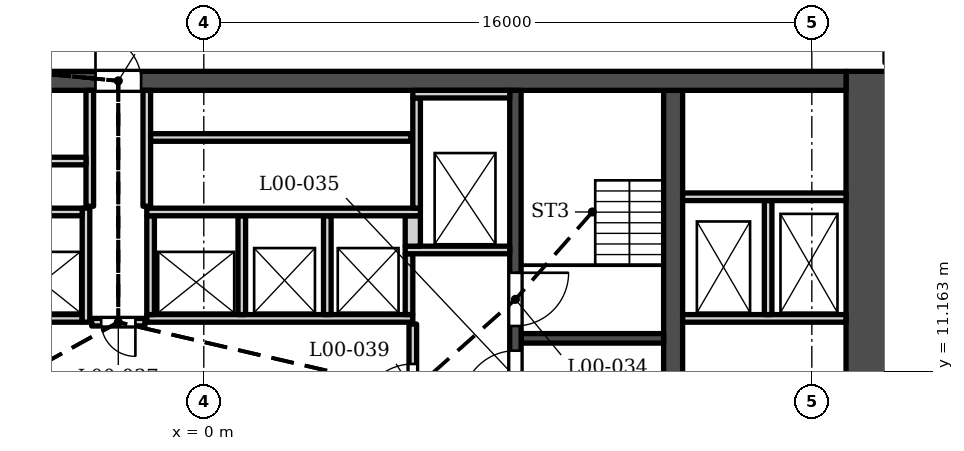
"""IFC4 building model, lengths in metres.
Left out: names, types, materials, properties, quantities, classifications, styles, units other than length and angle.
Written with IfcOpenShell. Run it as: python <this file> out.ifc"""

import sys

from ifc_helpers import new_model, si_unit, direction, frame, frame_2d, origin, place, context, subcontext, project, spatial, rectangle, extrude, element, fill, save


model = new_model("IFC4")
c1 = context("Model", 3, precision=1e-05, world=origin(), true_north=direction((0.0, 1.0)))
c2 = subcontext(c1, "Body", "Model", "MODEL_VIEW")
j1 = project(units=[si_unit("LENGTHUNIT", "METRE"), si_unit("PLANEANGLEUNIT", "RADIAN")], contexts=[c1])
p1 = place(None, origin())
s1 = spatial("IfcSite", under=j1, at=p1, CompositionType="ELEMENT")
p2 = place(p1, origin())
s2 = spatial("IfcBuilding", under=s1, at=p2, CompositionType="ELEMENT")
p3 = place(p2, origin())
s3 = spatial("IfcBuildingStorey", under=s2, at=p3, CompositionType="ELEMENT", Elevation=0.0)
p4 = place(p3, frame((-16.9, 18.802, 0.0), z_axis=(0.0, 0.0, 1.0), x_axis=(1.0, 0.0, 0.0)))
e1 = element("IfcWall", 1, at=p4, inside=s3, PredefinedType="SHEAR", context=c2, shape_type="SweptSolid", body=[
    extrude(rectangle(XDim=33.8, YDim=0.5, at=frame_2d((16.9, 0.0))), origin(), (0.0, 0.0, 1.0), 9.0),
])
p5 = place(p4, frame((14.05, 0.0, 0.0)))
e2 = element("IfcOpeningElement", 2, at=p5, cuts=e1, PredefinedType="OPENING", context=c2, shape_type="SweptSolid", body=[
    extrude(rectangle(XDim=1.2, YDim=2.1, at=frame_2d((0.6, 1.05))), frame((0.0, 0.26, 0.0), z_axis=(0.0, -1.0, 0.0), x_axis=(1.0, 0.0, 0.0)), (0.0, 0.0, 1.0), 0.52),
])
p6 = place(p3, frame((12.35, 5.253, 0.0), z_axis=(0.0, 0.0, 1.0), x_axis=(0.0, 1.0, 0.0)))
e3 = element("IfcWall", 3, at=p6, inside=s3, PredefinedType="SHEAR", context=c2, shape_type="SweptSolid", body=[
    extrude(rectangle(XDim=13.3, YDim=0.5, at=frame_2d((6.65, 0.0))), origin(), (0.0, 0.0, 1.0), 9.0),
])
p7 = place(p3, frame((8.2, 5.253, 0.0), z_axis=(0.0, 0.0, 1.0), x_axis=(0.0, 1.0, 0.0)))
e4 = element("IfcWall", 4, at=p7, inside=s3, PredefinedType="SHEAR", context=c2, shape_type="SweptSolid", body=[
    extrude(rectangle(XDim=13.3, YDim=0.3, at=frame_2d((6.65, 0.0))), origin(), (0.0, 0.0, 1.0), 9.0),
])
p8 = place(p7, frame((7.1, 0.0, 0.0)))
e5 = element("IfcOpeningElement", 5, at=p8, cuts=e4, PredefinedType="OPENING", context=c2, shape_type="SweptSolid", body=[
    extrude(rectangle(XDim=1.4, YDim=2.1, at=frame_2d((0.7, 1.05))), frame((0.0, 0.16, 0.0), z_axis=(0.0, -1.0, 0.0), x_axis=(1.0, 0.0, 0.0)), (0.0, 0.0, 1.0), 0.32),
])
p9 = place(p7, frame((5.05, 0.0, 0.0)))
e6 = element("IfcOpeningElement", 6, at=p9, cuts=e4, PredefinedType="OPENING", context=c2, shape_type="SweptSolid", body=[
    extrude(rectangle(XDim=1.4, YDim=2.1, at=frame_2d((0.7, 1.05))), frame((0.0, 0.16, 0.0), z_axis=(0.0, -1.0, 0.0), x_axis=(1.0, 0.0, 0.0)), (0.0, 0.0, 1.0), 0.32),
])
p10 = place(p3, frame((8.35, 12.028, 0.0), z_axis=(0.0, 0.0, 1.0), x_axis=(1.0, 0.0, 0.0)))
e7 = element("IfcWall", 7, at=p10, inside=s3, PredefinedType="SHEAR", context=c2, shape_type="SweptSolid", body=[
    extrude(rectangle(XDim=3.75, YDim=0.25, at=frame_2d((1.875, 0.0))), origin(), (0.0, 0.0, 1.0), 9.0),
])
p11 = place(p3, frame((17.45, 5.853, 0.0), z_axis=(0.0, 0.0, 1.0), x_axis=(0.0, 1.0, 0.0)))
e8 = element("IfcWall", 8, at=p11, inside=s3, PredefinedType="SHEAR", context=c2, shape_type="SweptSolid", body=[
    extrude(rectangle(XDim=13.2, YDim=1.1, at=frame_2d((6.6, 0.0))), origin(), (0.0, 0.0, 1.0), 9.0),
])
p12 = place(p11, frame((4.1, 0.0, 0.0)))
e9 = element("IfcOpeningElement", 9, at=p12, cuts=e8, PredefinedType="OPENING", context=c2, shape_type="SweptSolid", body=[
    extrude(rectangle(XDim=1.6, YDim=2.1, at=frame_2d((0.8, 1.05))), frame((0.0, 0.56, 0.0), z_axis=(0.0, -1.0, 0.0), x_axis=(1.0, 0.0, 0.0)), (0.0, 0.0, 1.0), 1.12),
])
p13 = place(p11, frame((10.15, 0.0, 0.0)))
e10 = element("IfcOpeningElement", 10, at=p13, cuts=e8, PredefinedType="OPENING", context=c2, shape_type="SweptSolid", body=[
    extrude(rectangle(XDim=0.9, YDim=2.1, at=frame_2d((0.45, 1.05))), frame((0.0, 0.56, 0.0), z_axis=(0.0, -1.0, 0.0), x_axis=(1.0, 0.0, 0.0)), (0.0, 0.0, 1.0), 1.12),
])
p14 = place(p3, frame((5.5, 9.103, 0.0), z_axis=(0.0, 0.0, 1.0), x_axis=(0.0, 1.0, 0.0)))
e11 = element("IfcWall", 11, at=p14, inside=s3, PredefinedType="SOLIDWALL", context=c2, shape_type="SweptSolid", body=[
    extrude(rectangle(XDim=3.3, YDim=0.2, at=frame_2d((1.65, 0.0))), origin(), (0.0, 0.0, 1.0), 8.5),
])
p15 = place(p14, frame((0.85, 0.0, 0.0)))
e12 = element("IfcOpeningElement", 12, at=p15, cuts=e11, PredefinedType="OPENING", context=c2, shape_type="SweptSolid", body=[
    extrude(rectangle(XDim=1.4, YDim=2.1, at=frame_2d((0.7, 1.05))), frame((0.0, 0.11, 0.0), z_axis=(0.0, -1.0, 0.0), x_axis=(1.0, 0.0, 0.0)), (0.0, 0.0, 1.0), 0.22),
])
p16 = place(p3, frame((-2.95, 12.453, 0.0), z_axis=(0.0, 0.0, 1.0), x_axis=(1.0, 0.0, 0.0)))
e13 = element("IfcWall", 13, at=p16, inside=s3, PredefinedType="SOLIDWALL", context=c2, shape_type="SweptSolid", body=[
    extrude(rectangle(XDim=1.4, YDim=0.2, at=frame_2d((0.7, 0.0))), origin(), (0.0, 0.0, 1.0), 8.5),
])
p17 = place(p16, frame((0.25, 0.0, 0.0)))
e14 = element("IfcOpeningElement", 14, at=p17, cuts=e13, PredefinedType="OPENING", context=c2, shape_type="SweptSolid", body=[
    extrude(rectangle(XDim=0.9, YDim=2.1, at=frame_2d((0.45, 1.05))), frame((0.0, 0.11, 0.0), z_axis=(0.0, -1.0, 0.0), x_axis=(1.0, 0.0, 0.0)), (0.0, 0.0, 1.0), 0.22),
])
p18 = place(p3, frame((-5.3, 12.552, 0.0), z_axis=(0.0, 0.0, 1.0), x_axis=(1.0, 0.0, 0.0)))
e15 = element("IfcWall", 15, at=p18, inside=s3, PredefinedType="SOLIDWALL", context=c2, shape_type="SweptSolid", body=[
    extrude(rectangle(XDim=2.1, YDim=0.2, at=frame_2d((1.05, 0.0))), origin(), (0.0, 0.0, 1.0), 8.5),
])
p19 = place(p18, frame((0.35, 0.0, 0.0)))
e16 = element("IfcOpeningElement", 16, at=p19, cuts=e15, PredefinedType="OPENING", context=c2, shape_type="SweptSolid", body=[
    extrude(rectangle(XDim=1.4, YDim=2.4, at=frame_2d((0.7, 1.2))), frame((0.0, 0.11, 0.0), z_axis=(0.0, -1.0, 0.0), x_axis=(1.0, 0.0, 0.0)), (0.0, 0.0, 1.0), 0.22),
])
p20 = place(p3, frame((-3.1, 12.453, 0.0), z_axis=(0.0, 0.0, 1.0), x_axis=(0.0, 1.0, 0.0)))
e17 = element("IfcWall", 17, at=p20, inside=s3, PredefinedType="SOLIDWALL", context=c2, shape_type="SweptSolid", body=[
    extrude(rectangle(XDim=3.0, YDim=0.2, at=frame_2d((1.5, 0.0))), origin(), (0.0, 0.0, 1.0), 8.5),
])
p21 = place(p3, frame((-1.5, 12.552, 0.0), z_axis=(0.0, 0.0, 1.0), x_axis=(1.0, 0.0, 0.0)))
e18 = element("IfcWall", 18, at=p21, inside=s3, PredefinedType="SOLIDWALL", context=c2, shape_type="SweptSolid", body=[
    extrude(rectangle(XDim=7.0, YDim=0.2, at=frame_2d((3.5, 0.0))), origin(), (0.0, 0.0, 1.0), 8.5),
])
p22 = place(p21, frame((0.6, 0.0, 0.0)))
e19 = element("IfcOpeningElement", 19, at=p22, cuts=e18, PredefinedType="OPENING", context=c2, shape_type="SweptSolid", body=[
    extrude(rectangle(XDim=1.4, YDim=2.4, at=frame_2d((0.7, 1.2))), frame((0.0, 0.11, 0.0), z_axis=(0.0, -1.0, 0.0), x_axis=(1.0, 0.0, 0.0)), (0.0, 0.0, 1.0), 0.22),
])
p23 = place(p21, frame((3.075, 0.0, 0.0)))
e20 = element("IfcOpeningElement", 20, at=p23, cuts=e18, PredefinedType="OPENING", context=c2, shape_type="SweptSolid", body=[
    extrude(rectangle(XDim=1.1, YDim=2.1, at=frame_2d((0.55, 1.05))), frame((0.0, 0.11, 0.0), z_axis=(0.0, -1.0, 0.0), x_axis=(1.0, 0.0, 0.0)), (0.0, 0.0, 1.0), 0.22),
])
p24 = place(p21, frame((5.275, 0.0, 0.0)))
e21 = element("IfcOpeningElement", 21, at=p24, cuts=e18, PredefinedType="OPENING", context=c2, shape_type="SweptSolid", body=[
    extrude(rectangle(XDim=1.1, YDim=2.1, at=frame_2d((0.55, 1.05))), frame((0.0, 0.11, 0.0), z_axis=(0.0, -1.0, 0.0), x_axis=(1.0, 0.0, 0.0)), (0.0, 0.0, 1.0), 0.22),
])
p25 = place(p3, frame((12.6, 12.552, 0.0), z_axis=(0.0, 0.0, 1.0), x_axis=(1.0, 0.0, 0.0)))
e22 = element("IfcWall", 22, at=p25, inside=s3, PredefinedType="SOLIDWALL", context=c2, shape_type="SweptSolid", body=[
    extrude(rectangle(XDim=4.3, YDim=0.2, at=frame_2d((2.15, 0.0))), origin(), (0.0, 0.0, 1.0), 8.5),
])
p26 = place(p25, frame((0.475, 0.0, 0.0)))
e23 = element("IfcOpeningElement", 23, at=p26, cuts=e22, PredefinedType="OPENING", context=c2, shape_type="SweptSolid", body=[
    extrude(rectangle(XDim=1.2, YDim=2.1, at=frame_2d((0.6, 1.05))), frame((0.0, 0.11, 0.0), z_axis=(0.0, -1.0, 0.0), x_axis=(1.0, 0.0, 0.0)), (0.0, 0.0, 1.0), 0.22),
])
p27 = place(p25, frame((2.625, 0.0, 0.0)))
e24 = element("IfcOpeningElement", 24, at=p27, cuts=e22, PredefinedType="OPENING", context=c2, shape_type="SweptSolid", body=[
    extrude(rectangle(XDim=1.4, YDim=2.1, at=frame_2d((0.7, 1.05))), frame((0.0, 0.11, 0.0), z_axis=(0.0, -1.0, 0.0), x_axis=(1.0, 0.0, 0.0)), (0.0, 0.0, 1.0), 0.22),
])
for number, where, z_axis, x_axis in (
    (25, (-1.4, 12.653, 0.0), (0.0, 0.0, 1.0), (0.0, 1.0, 0.0)),
    (26, (1.0, 12.653, 0.0), (0.0, 0.0, 1.0), (0.0, 1.0, 0.0)),
    (27, (3.25, 12.653, 0.0), (0.0, 0.0, 1.0), (0.0, 1.0, 0.0)),
):
    element("IfcWall", number, at=place(p3, frame(where, z_axis=z_axis, x_axis=x_axis)), inside=s3, PredefinedType="SOLIDWALL", context=c2, shape_type="SweptSolid", body=[
        extrude(rectangle(XDim=2.6, YDim=0.2, at=frame_2d((1.3, 0.0))), origin(), (0.0, 0.0, 1.0), 8.5),
    ])
p28 = place(p3, frame((5.4, 12.653, 0.0), z_axis=(0.0, 0.0, 1.0), x_axis=(0.0, 1.0, 0.0)))
e28 = element("IfcWall", 28, at=p28, inside=s3, PredefinedType="SOLIDWALL", context=c2, shape_type="SweptSolid", body=[
    extrude(rectangle(XDim=1.6, YDim=0.2, at=frame_2d((0.8, 0.0))), origin(), (0.0, 0.0, 1.0), 8.5),
])
p29 = place(p3, frame((14.85, 12.653, 0.0), z_axis=(0.0, 0.0, 1.0), x_axis=(0.0, 1.0, 0.0)))
e29 = element("IfcWall", 29, at=p29, inside=s3, PredefinedType="SOLIDWALL", context=c2, shape_type="SweptSolid", body=[
    extrude(rectangle(XDim=3.0, YDim=0.2, at=frame_2d((1.5, 0.0))), origin(), (0.0, 0.0, 1.0), 8.5),
])
p30 = place(p3, frame((5.3, 14.353, 0.0), z_axis=(0.0, 0.0, 1.0), x_axis=(1.0, 0.0, 0.0)))
e30 = element("IfcWall", 30, at=p30, inside=s3, PredefinedType="SOLIDWALL", context=c2, shape_type="SweptSolid", body=[
    extrude(rectangle(XDim=2.75, YDim=0.2, at=frame_2d((1.375, 0.0))), origin(), (0.0, 0.0, 1.0), 8.5),
])
p31 = place(p30, frame((0.975, 0.0, 0.0)))
e31 = element("IfcOpeningElement", 31, at=p31, cuts=e30, PredefinedType="OPENING", context=c2, shape_type="SweptSolid", body=[
    extrude(rectangle(XDim=1.2, YDim=2.1, at=frame_2d((0.6, 1.05))), frame((0.0, 0.11, 0.0), z_axis=(0.0, -1.0, 0.0), x_axis=(1.0, 0.0, 0.0)), (0.0, 0.0, 1.0), 0.22),
])
p32 = place(p3, frame((5.5, 14.453, 0.0), z_axis=(0.0, 0.0, 1.0), x_axis=(0.0, 1.0, 0.0)))
e32 = element("IfcWall", 32, at=p32, inside=s3, PredefinedType="SOLIDWALL", context=c2, shape_type="SweptSolid", body=[
    extrude(rectangle(XDim=0.8, YDim=0.4, at=frame_2d((0.4, 0.0))), origin(), (0.0, 0.0, 1.0), 8.5),
])
p33 = place(p3, frame((-5.3, 15.353, 0.0), z_axis=(0.0, 0.0, 1.0), x_axis=(1.0, 0.0, 0.0)))
e33 = element("IfcWall", 33, at=p33, inside=s3, PredefinedType="SOLIDWALL", context=c2, shape_type="SweptSolid", body=[
    extrude(rectangle(XDim=2.1, YDim=0.2, at=frame_2d((1.05, 0.0))), origin(), (0.0, 0.0, 1.0), 8.5),
])
p34 = place(p3, frame((-1.5, 15.353, 0.0), z_axis=(0.0, 0.0, 1.0), x_axis=(1.0, 0.0, 0.0)))
e34 = element("IfcWall", 34, at=p34, inside=s3, PredefinedType="SOLIDWALL", context=c2, shape_type="SweptSolid", body=[
    extrude(rectangle(XDim=7.2, YDim=0.2, at=frame_2d((3.6, 0.0))), origin(), (0.0, 0.0, 1.0), 8.5),
])
p35 = place(p3, frame((5.6, 15.453, 0.0), z_axis=(0.0, 0.0, 1.0), x_axis=(0.0, 1.0, 0.0)))
e35 = element("IfcWall", 35, at=p35, inside=s3, PredefinedType="SOLIDWALL", context=c2, shape_type="SweptSolid", body=[
    extrude(rectangle(XDim=2.9, YDim=0.2, at=frame_2d((1.45, 0.0))), origin(), (0.0, 0.0, 1.0), 8.5),
])
p36 = place(p3, frame((-3.0, 15.503, 0.0), z_axis=(0.0, 0.0, 1.0), x_axis=(0.0, 1.0, 0.0)))
e36 = element("IfcWall", 36, at=p36, inside=s3, PredefinedType="SOLIDWALL", context=c2, shape_type="SweptSolid", body=[
    extrude(rectangle(XDim=3.05, YDim=0.2, at=frame_2d((1.525, 0.0))), origin(), (0.0, 0.0, 1.0), 8.5),
])
p37 = place(p36, frame((0.12, 0.0, 0.0)))
e37 = element("IfcOpeningElement", 37, at=p37, cuts=e36, PredefinedType="OPENING", context=c2, shape_type="SweptSolid", body=[
    extrude(rectangle(XDim=0.9, YDim=2.1, at=frame_2d((0.45, 1.05))), frame((0.0, 0.11, 0.0), z_axis=(0.0, -1.0, 0.0), x_axis=(1.0, 0.0, 0.0)), (0.0, 0.0, 1.0), 0.22),
])
p38 = place(p36, frame((1.67, 0.0, 0.0)))
e38 = element("IfcOpeningElement", 38, at=p38, cuts=e36, PredefinedType="OPENING", context=c2, shape_type="SweptSolid", body=[
    extrude(rectangle(XDim=0.9, YDim=2.1, at=frame_2d((0.45, 1.05))), frame((0.0, 0.11, 0.0), z_axis=(0.0, -1.0, 0.0), x_axis=(1.0, 0.0, 0.0)), (0.0, 0.0, 1.0), 0.22),
])
p39 = place(p3, frame((-1.5, 15.503, 0.0), z_axis=(0.0, 0.0, 1.0), x_axis=(0.0, 1.0, 0.0)))
e39 = element("IfcWall", 39, at=p39, inside=s3, PredefinedType="SOLIDWALL", context=c2, shape_type="SweptSolid", body=[
    extrude(rectangle(XDim=3.05, YDim=0.2, at=frame_2d((1.525, 0.0))), origin(), (0.0, 0.0, 1.0), 8.5),
])
p40 = place(p39, frame((0.43, 0.0, 0.0)))
e40 = element("IfcOpeningElement", 40, at=p40, cuts=e39, PredefinedType="OPENING", context=c2, shape_type="SweptSolid", body=[
    extrude(rectangle(XDim=0.9, YDim=2.1, at=frame_2d((0.45, 1.05))), frame((0.0, 0.11, 0.0), z_axis=(0.0, -1.0, 0.0), x_axis=(1.0, 0.0, 0.0)), (0.0, 0.0, 1.0), 0.22),
])
p41 = place(p39, frame((1.98, 0.0, 0.0)))
e41 = element("IfcOpeningElement", 41, at=p41, cuts=e39, PredefinedType="OPENING", context=c2, shape_type="SweptSolid", body=[
    extrude(rectangle(XDim=0.9, YDim=2.1, at=frame_2d((0.45, 1.05))), frame((0.0, 0.11, 0.0), z_axis=(0.0, -1.0, 0.0), x_axis=(1.0, 0.0, 0.0)), (0.0, 0.0, 1.0), 0.22),
])
p42 = place(p3, frame((12.6, 15.753, 0.0), z_axis=(0.0, 0.0, 1.0), x_axis=(1.0, 0.0, 0.0)))
e42 = element("IfcWall", 42, at=p42, inside=s3, PredefinedType="SOLIDWALL", context=c2, shape_type="SweptSolid", body=[
    extrude(rectangle(XDim=4.3, YDim=0.2, at=frame_2d((2.15, 0.0))), origin(), (0.0, 0.0, 1.0), 8.5),
])
p43 = place(p3, frame((-5.45, 16.693, 0.0), z_axis=(0.0, 0.0, 1.0), x_axis=(1.0, 0.0, 0.0)))
e43 = element("IfcWall", 43, at=p43, inside=s3, PredefinedType="SOLIDWALL", context=c2, shape_type="SweptSolid", body=[
    extrude(rectangle(XDim=2.35, YDim=0.2, at=frame_2d((1.175, 0.0))), origin(), (0.0, 0.0, 1.0), 8.5),
])
p44 = place(p3, frame((-1.4, 17.312, 0.0), z_axis=(0.0, 0.0, 1.0), x_axis=(1.0, 0.0, 0.0)))
e44 = element("IfcWall", 44, at=p44, inside=s3, PredefinedType="SOLIDWALL", context=c2, shape_type="SweptSolid", body=[
    extrude(rectangle(XDim=6.85, YDim=0.2, at=frame_2d((3.425, 0.0))), origin(), (0.0, 0.0, 1.0), 8.5),
])
p45 = place(p3, frame((5.5, 18.453, 0.0), z_axis=(0.0, 0.0, 1.0), x_axis=(1.0, 0.0, 0.0)))
e45 = element("IfcWall", 45, at=p45, inside=s3, PredefinedType="SOLIDWALL", context=c2, shape_type="SweptSolid", body=[
    extrude(rectangle(XDim=2.55, YDim=0.2, at=frame_2d((1.275, 0.0))), origin(), (0.0, 0.0, 1.0), 8.5),
])
p46 = place(p19, origin())
e46 = element("IfcDoor", 46, at=p46, inside=s3, OperationType="DOUBLE_DOOR_SLIDING", PredefinedType="DOOR", context=c2, shape_type="SweptSolid", body=[
    extrude(rectangle(XDim=1.4, YDim=2.4, at=frame_2d((0.7, 1.2))), frame((0.0, 0.025, 0.0), z_axis=(0.0, -1.0, 0.0), x_axis=(1.0, 0.0, 0.0)), (0.0, 0.0, 1.0), 0.05),
])
fill(e16, e46)
p47 = place(p22, origin())
e47 = element("IfcDoor", 47, at=p47, inside=s3, OperationType="DOUBLE_DOOR_SLIDING", PredefinedType="DOOR", context=c2, shape_type="SweptSolid", body=[
    extrude(rectangle(XDim=1.4, YDim=2.4, at=frame_2d((0.7, 1.2))), frame((0.0, 0.025, 0.0), z_axis=(0.0, -1.0, 0.0), x_axis=(1.0, 0.0, 0.0)), (0.0, 0.0, 1.0), 0.05),
])
fill(e19, e47)
p48 = place(p23, origin())
e48 = element("IfcDoor", 48, at=p48, inside=s3, OperationType="DOUBLE_DOOR_SLIDING", PredefinedType="DOOR", context=c2, shape_type="SweptSolid", body=[
    extrude(rectangle(XDim=1.1, YDim=2.1, at=frame_2d((0.55, 1.05))), frame((0.0, 0.025, 0.0), z_axis=(0.0, -1.0, 0.0), x_axis=(1.0, 0.0, 0.0)), (0.0, 0.0, 1.0), 0.05),
])
fill(e20, e48)
p49 = place(p24, origin())
e49 = element("IfcDoor", 49, at=p49, inside=s3, OperationType="DOUBLE_DOOR_SLIDING", PredefinedType="DOOR", context=c2, shape_type="SweptSolid", body=[
    extrude(rectangle(XDim=1.1, YDim=2.1, at=frame_2d((0.55, 1.05))), frame((0.0, 0.025, 0.0), z_axis=(0.0, -1.0, 0.0), x_axis=(1.0, 0.0, 0.0)), (0.0, 0.0, 1.0), 0.05),
])
fill(e21, e49)
p50 = place(p31, origin())
e50 = element("IfcDoor", 50, at=p50, inside=s3, OperationType="DOUBLE_DOOR_SLIDING", PredefinedType="DOOR", context=c2, shape_type="SweptSolid", body=[
    extrude(rectangle(XDim=1.2, YDim=2.1, at=frame_2d((0.6, 1.05))), frame((0.0, 0.025, 0.0), z_axis=(0.0, -1.0, 0.0), x_axis=(1.0, 0.0, 0.0)), (0.0, 0.0, 1.0), 0.05),
])
fill(e31, e50)
p51 = place(p26, origin())
e51 = element("IfcDoor", 51, at=p51, inside=s3, OperationType="DOUBLE_DOOR_SLIDING", PredefinedType="DOOR", context=c2, shape_type="SweptSolid", body=[
    extrude(rectangle(XDim=1.2, YDim=2.1, at=frame_2d((0.6, 1.05))), frame((0.0, 0.025, 0.0), z_axis=(0.0, -1.0, 0.0), x_axis=(1.0, 0.0, 0.0)), (0.0, 0.0, 1.0), 0.05),
])
fill(e23, e51)
p52 = place(p27, origin())
e52 = element("IfcDoor", 52, at=p52, inside=s3, OperationType="DOUBLE_DOOR_SLIDING", PredefinedType="DOOR", context=c2, shape_type="SweptSolid", body=[
    extrude(rectangle(XDim=1.4, YDim=2.1, at=frame_2d((0.7, 1.05))), frame((0.0, 0.025, 0.0), z_axis=(0.0, -1.0, 0.0), x_axis=(1.0, 0.0, 0.0)), (0.0, 0.0, 1.0), 0.05),
])
fill(e24, e52)
p53 = place(p8, origin())
e53 = element("IfcDoor", 53, at=p53, inside=s3, OperationType="SINGLE_SWING_RIGHT", PredefinedType="DOOR", context=c2, shape_type="SweptSolid", body=[
    extrude(rectangle(XDim=1.4, YDim=2.1, at=frame_2d((0.7, 1.05))), frame((0.0, 0.025, 0.0), z_axis=(0.0, -1.0, 0.0), x_axis=(1.0, 0.0, 0.0)), (0.0, 0.0, 1.0), 0.05),
])
fill(e5, e53)
p54 = place(p9, origin())
e54 = element("IfcDoor", 54, at=p54, inside=s3, OperationType="SINGLE_SWING_LEFT", PredefinedType="DOOR", context=c2, shape_type="SweptSolid", body=[
    extrude(rectangle(XDim=1.4, YDim=2.1, at=frame_2d((0.7, 1.05))), frame((0.0, 0.025, 0.0), z_axis=(0.0, -1.0, 0.0), x_axis=(1.0, 0.0, 0.0)), (0.0, 0.0, 1.0), 0.05),
])
fill(e6, e54)
p55 = place(p5, origin())
e55 = element("IfcDoor", 55, at=p55, inside=s3, OperationType="SINGLE_SWING_LEFT", PredefinedType="DOOR", context=c2, shape_type="SweptSolid", body=[
    extrude(rectangle(XDim=1.2, YDim=2.1, at=frame_2d((0.6, 1.05))), frame((0.0, 0.025, 0.0), z_axis=(0.0, -1.0, 0.0), x_axis=(1.0, 0.0, 0.0)), (0.0, 0.0, 1.0), 0.05),
])
fill(e2, e55)
p56 = place(p17, origin())
e56 = element("IfcDoor", 56, at=p56, inside=s3, OperationType="SINGLE_SWING_RIGHT", PredefinedType="DOOR", context=c2, shape_type="SweptSolid", body=[
    extrude(rectangle(XDim=0.9, YDim=2.1, at=frame_2d((0.45, 1.05))), frame((0.0, 0.025, 0.0), z_axis=(0.0, -1.0, 0.0), x_axis=(1.0, 0.0, 0.0)), (0.0, 0.0, 1.0), 0.05),
])
fill(e14, e56)
p57 = place(p15, origin())
e57 = element("IfcDoor", 57, at=p57, inside=s3, OperationType="SINGLE_SWING_LEFT", PredefinedType="DOOR", context=c2, shape_type="SweptSolid", body=[
    extrude(rectangle(XDim=1.4, YDim=2.1, at=frame_2d((0.7, 1.05))), frame((0.0, 0.025, 0.0), z_axis=(0.0, -1.0, 0.0), x_axis=(1.0, 0.0, 0.0)), (0.0, 0.0, 1.0), 0.05),
])
fill(e12, e57)
p58 = place(p37, origin())
e58 = element("IfcDoor", 58, at=p58, inside=s3, OperationType="SINGLE_SWING_LEFT", PredefinedType="DOOR", context=c2, shape_type="SweptSolid", body=[
    extrude(rectangle(XDim=0.9, YDim=2.1, at=frame_2d((0.45, 1.05))), frame((0.0, 0.025, 0.0), z_axis=(0.0, -1.0, 0.0), x_axis=(1.0, 0.0, 0.0)), (0.0, 0.0, 1.0), 0.05),
])
fill(e37, e58)
p59 = place(p38, origin())
e59 = element("IfcDoor", 59, at=p59, inside=s3, OperationType="SINGLE_SWING_LEFT", PredefinedType="DOOR", context=c2, shape_type="SweptSolid", body=[
    extrude(rectangle(XDim=0.9, YDim=2.1, at=frame_2d((0.45, 1.05))), frame((0.0, 0.025, 0.0), z_axis=(0.0, -1.0, 0.0), x_axis=(1.0, 0.0, 0.0)), (0.0, 0.0, 1.0), 0.05),
])
fill(e38, e59)
p60 = place(p40, origin())
e60 = element("IfcDoor", 60, at=p60, inside=s3, OperationType="SINGLE_SWING_LEFT", PredefinedType="DOOR", context=c2, shape_type="SweptSolid", body=[
    extrude(rectangle(XDim=0.9, YDim=2.1, at=frame_2d((0.45, 1.05))), frame((0.0, 0.025, 0.0), z_axis=(0.0, -1.0, 0.0), x_axis=(1.0, 0.0, 0.0)), (0.0, 0.0, 1.0), 0.05),
])
fill(e40, e60)
p61 = place(p41, origin())
e61 = element("IfcDoor", 61, at=p61, inside=s3, OperationType="SINGLE_SWING_LEFT", PredefinedType="DOOR", context=c2, shape_type="SweptSolid", body=[
    extrude(rectangle(XDim=0.9, YDim=2.1, at=frame_2d((0.45, 1.05))), frame((0.0, 0.025, 0.0), z_axis=(0.0, -1.0, 0.0), x_axis=(1.0, 0.0, 0.0)), (0.0, 0.0, 1.0), 0.05),
])
fill(e41, e61)
p62 = place(p12, origin())
e62 = element("IfcDoor", 62, at=p62, inside=s3, OperationType="DOUBLE_DOOR_SINGLE_SWING", PredefinedType="DOOR", context=c2, shape_type="SweptSolid", body=[
    extrude(rectangle(XDim=1.6, YDim=2.1, at=frame_2d((0.8, 1.05))), frame((0.0, 0.275, 0.0), z_axis=(0.0, -1.0, 0.0), x_axis=(1.0, 0.0, 0.0)), (0.0, 0.0, 1.0), 0.05),
])
fill(e9, e62)
p63 = place(p13, origin())
e63 = element("IfcDoor", 63, at=p63, inside=s3, OperationType="SINGLE_SWING_LEFT", PredefinedType="DOOR", context=c2, shape_type="SweptSolid", body=[
    extrude(rectangle(XDim=0.9, YDim=2.1, at=frame_2d((0.45, 1.05))), frame((0.0, 0.275, 0.0), z_axis=(0.0, -1.0, 0.0), x_axis=(1.0, 0.0, 0.0)), (0.0, 0.0, 1.0), 0.05),
])
fill(e10, e63)
save(model, sys.argv[1])
